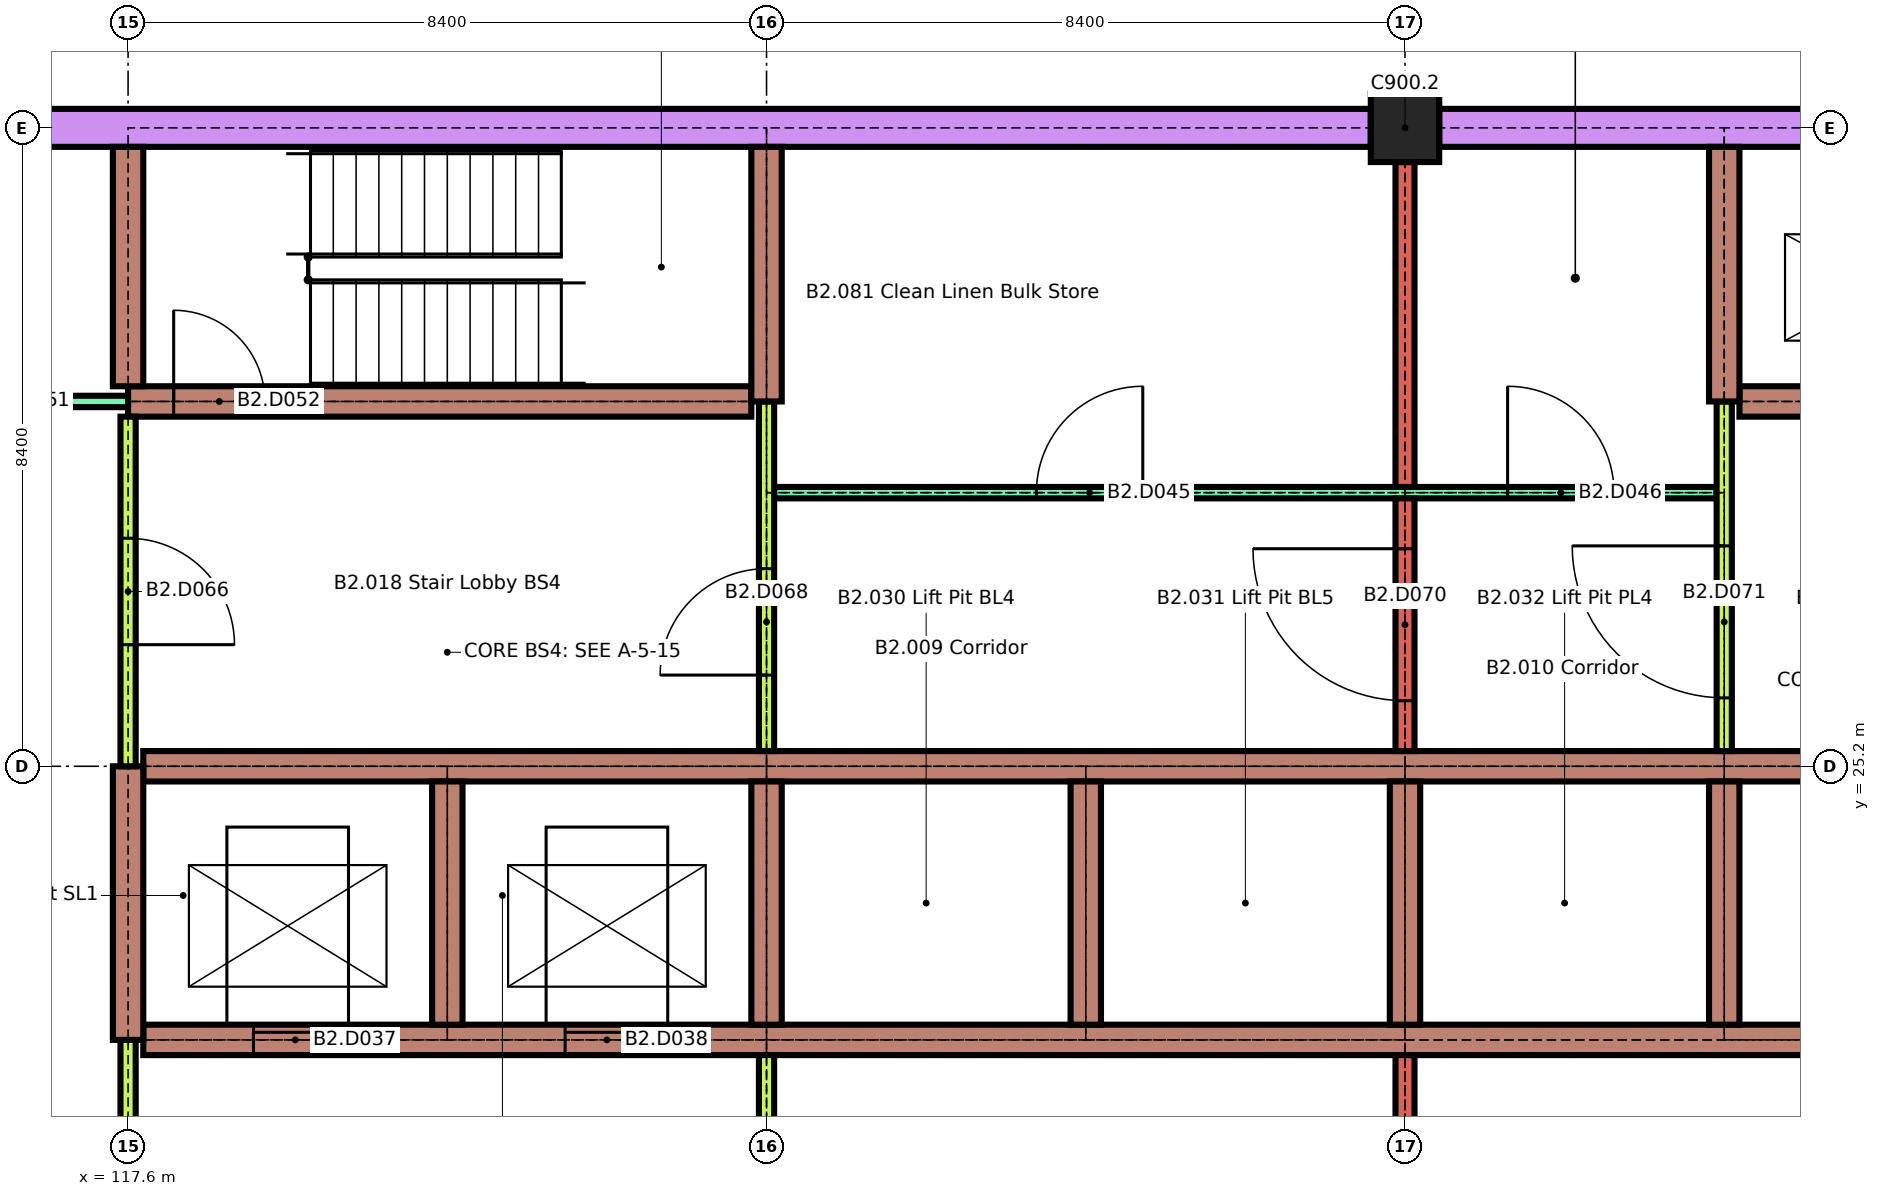
"""IFC4 building model, lengths in metres.
Left out: names, types, materials, properties, quantities, classifications, styles, units other than length and angle.
Written with IfcOpenShell. Run it as: python <this file> out.ifc"""

import sys

from ifc_helpers import new_model, si_unit, direction, frame, frame_2d, origin, origin_2d, place, context, subcontext, project, spatial, rectangle, extrude, element, fill, save


model = new_model("IFC4")
c1 = context("Model", 3, precision=1e-05, world=origin(), true_north=direction((0.0, 1.0)))
c2 = subcontext(c1, "Body", "Model", "MODEL_VIEW")
j1 = project(units=[si_unit("LENGTHUNIT", "METRE"), si_unit("PLANEANGLEUNIT", "RADIAN")], contexts=[c1])
p1 = place(None, origin())
s1 = spatial("IfcSite", under=j1, at=p1, CompositionType="ELEMENT")
p2 = place(p1, origin())
s2 = spatial("IfcBuilding", under=s1, at=p2, CompositionType="ELEMENT")
p3 = place(p2, frame((0.0, 0.0, -7.8)))
s3 = spatial("IfcBuildingStorey", under=s2, at=p3, CompositionType="ELEMENT", Elevation=-7.8)
p4 = place(p3, frame((134.4, 33.6, 0.0), z_axis=(0.0, 0.0, 1.0), x_axis=(1.0, 0.0, 0.0)))
e1 = element("IfcColumn", 1, at=p4, inside=s3, PredefinedType="COLUMN", context=c2, shape_type="SweptSolid", body=[
    extrude(rectangle(XDim=0.9, YDim=0.9, at=origin_2d()), origin(), (0.0, 0.0, 1.0), 3.1),
])
p5 = place(p3, frame((101.25, 33.6, 0.0), z_axis=(0.0, 0.0, 1.0), x_axis=(1.0, 0.0, 0.0)))
e2 = element("IfcWall", 2, at=p5, inside=s3, PredefinedType="SOLIDWALL", context=c2, shape_type="SweptSolid", body=[
    extrude(rectangle(XDim=32.7, YDim=0.5, at=frame_2d((16.35, 0.0))), origin(), (0.0, 0.0, 1.0), 3.1),
])
p6 = place(p3, frame((134.85, 33.6, 0.0), z_axis=(0.0, 0.0, 1.0), x_axis=(1.0, 0.0, 0.0)))
e3 = element("IfcWall", 3, at=p6, inside=s3, PredefinedType="SOLIDWALL", context=c2, shape_type="SweptSolid", body=[
    extrude(rectangle(XDim=15.9, YDim=0.5, at=frame_2d((7.95, 0.0))), origin(), (0.0, 0.0, 1.0), 3.1),
])
p7 = place(p3, frame((117.8, 21.6, 0.0), z_axis=(0.0, 0.0, 1.0), x_axis=(1.0, 0.0, 0.0)))
e4 = element("IfcWall", 4, at=p7, inside=s3, PredefinedType="SHEAR", context=c2, shape_type="SweptSolid", body=[
    extrude(rectangle(XDim=25.0, YDim=0.4, at=frame_2d((12.5, 0.0))), origin(), (0.0, 0.0, 1.0), 3.1),
])
p8 = place(p7, frame((1.45, 0.0, 0.0)))
e5 = element("IfcOpeningElement", 5, at=p8, cuts=e4, PredefinedType="OPENING", context=c2, shape_type="SweptSolid", body=[
    extrude(rectangle(XDim=1.1, YDim=2.1, at=frame_2d((0.55, 1.05))), frame((0.0, 0.21, 0.0), z_axis=(0.0, -1.0, 0.0), x_axis=(1.0, 0.0, 0.0)), (0.0, 0.0, 1.0), 0.42),
])
p9 = place(p7, frame((5.55, 0.0, 0.0)))
e6 = element("IfcOpeningElement", 6, at=p9, cuts=e4, PredefinedType="OPENING", context=c2, shape_type="SweptSolid", body=[
    extrude(rectangle(XDim=1.1, YDim=2.1, at=frame_2d((0.55, 1.05))), frame((0.0, 0.21, 0.0), z_axis=(0.0, -1.0, 0.0), x_axis=(1.0, 0.0, 0.0)), (0.0, 0.0, 1.0), 0.42),
])
p10 = place(p3, frame((117.8, 25.2, 0.0), z_axis=(0.0, 0.0, 1.0), x_axis=(1.0, 0.0, 0.0)))
e7 = element("IfcWall", 7, at=p10, inside=s3, PredefinedType="SHEAR", context=c2, shape_type="SweptSolid", body=[
    extrude(rectangle(XDim=24.8, YDim=0.4, at=frame_2d((12.4, 0.0))), origin(), (0.0, 0.0, 1.0), 3.1),
])
p11 = place(p3, frame((126.1, 28.8, 0.0), z_axis=(0.0, 0.0, 1.0), x_axis=(1.0, 0.0, 0.0)))
e8 = element("IfcWall", 8, at=p11, inside=s3, PredefinedType="PARTITIONING", context=c2, shape_type="SweptSolid", body=[
    extrude(rectangle(XDim=12.4, YDim=0.15, at=frame_2d((6.2, 0.0))), origin(), (0.0, 0.0, 1.0), 3.1),
])
p12 = place(p11, frame((3.45, 0.0, 0.0)))
e9 = element("IfcOpeningElement", 9, at=p12, cuts=e8, PredefinedType="OPENING", context=c2, shape_type="SweptSolid", body=[
    extrude(rectangle(XDim=1.4, YDim=2.1, at=frame_2d((0.7, 1.05))), frame((0.0, 0.085, 0.0), z_axis=(0.0, -1.0, 0.0), x_axis=(1.0, 0.0, 0.0)), (0.0, 0.0, 1.0), 0.17),
])
p13 = place(p11, frame((9.65, 0.0, 0.0)))
e10 = element("IfcOpeningElement", 10, at=p13, cuts=e8, PredefinedType="OPENING", context=c2, shape_type="SweptSolid", body=[
    extrude(rectangle(XDim=1.4, YDim=2.1, at=frame_2d((0.7, 1.05))), frame((0.0, 0.085, 0.0), z_axis=(0.0, -1.0, 0.0), x_axis=(1.0, 0.0, 0.0)), (0.0, 0.0, 1.0), 0.17),
])
p14 = place(p3, frame((113.325, 30.0, 0.0), z_axis=(0.0, 0.0, 1.0), x_axis=(1.0, 0.0, 0.0)))
e11 = element("IfcWall", 11, at=p14, inside=s3, PredefinedType="PARTITIONING", context=c2, shape_type="SweptSolid", body=[
    extrude(rectangle(XDim=4.275, YDim=0.15, at=frame_2d((2.138, 0.0))), origin(), (0.0, 0.0, 1.0), 3.1),
])
p15 = place(p14, frame((1.475, 0.0, 0.0)))
e12 = element("IfcOpeningElement", 12, at=p15, cuts=e11, PredefinedType="OPENING", context=c2, shape_type="SweptSolid", body=[
    extrude(rectangle(XDim=1.4, YDim=2.1, at=frame_2d((0.7, 1.05))), frame((0.0, 0.085, 0.0), z_axis=(0.0, -1.0, 0.0), x_axis=(1.0, 0.0, 0.0)), (0.0, 0.0, 1.0), 0.17),
])
p16 = place(p3, frame((117.6, 30.0, 0.0), z_axis=(0.0, 0.0, 1.0), x_axis=(1.0, 0.0, 0.0)))
e13 = element("IfcWall", 13, at=p16, inside=s3, PredefinedType="SHEAR", context=c2, shape_type="SweptSolid", body=[
    extrude(rectangle(XDim=8.2, YDim=0.4, at=frame_2d((4.1, 0.0))), origin(), (0.0, 0.0, 1.0), 3.1),
])
p17 = place(p16, frame((0.6, 0.0, 0.0)))
e14 = element("IfcOpeningElement", 14, at=p17, cuts=e13, PredefinedType="OPENING", context=c2, shape_type="SweptSolid", body=[
    extrude(rectangle(XDim=1.2, YDim=2.1, at=frame_2d((0.6, 1.05))), frame((0.0, 0.21, 0.0), z_axis=(0.0, -1.0, 0.0), x_axis=(1.0, 0.0, 0.0)), (0.0, 0.0, 1.0), 0.42),
])
p18 = place(p3, frame((138.8, 30.0, 0.0), z_axis=(0.0, 0.0, 1.0), x_axis=(1.0, 0.0, 0.0)))
e15 = element("IfcWall", 15, at=p18, inside=s3, PredefinedType="SHEAR", context=c2, shape_type="SweptSolid", body=[
    extrude(rectangle(XDim=3.8, YDim=0.4, at=frame_2d((1.9, 0.0))), origin(), (0.0, 0.0, 1.0), 3.1),
])
p19 = place(p18, frame((1.35, 0.0, 0.0)))
e16 = element("IfcOpeningElement", 16, at=p19, cuts=e15, PredefinedType="OPENING", context=c2, shape_type="SweptSolid", body=[
    extrude(rectangle(XDim=1.1, YDim=2.1, at=frame_2d((0.55, 1.05))), frame((0.0, 0.21, 0.0), z_axis=(0.0, -1.0, 0.0), x_axis=(1.0, 0.0, 0.0)), (0.0, 0.0, 1.0), 0.42),
])
p20 = place(p3, frame((117.6, 16.9, 0.0), z_axis=(0.0, 0.0, 1.0), x_axis=(0.0, 1.0, 0.0)))
e17 = element("IfcWall", 17, at=p20, inside=s3, PredefinedType="PARTITIONING", context=c2, shape_type="SweptSolid", body=[
    extrude(rectangle(XDim=4.7, YDim=0.2, at=frame_2d((2.35, 0.0))), origin(), (0.0, 0.0, 1.0), 3.1),
])
p21 = place(p20, frame((1.35, 0.0, 0.0)))
e18 = element("IfcOpeningElement", 18, at=p21, cuts=e17, PredefinedType="OPENING", context=c2, shape_type="SweptSolid", body=[
    extrude(rectangle(XDim=2.0, YDim=2.4, at=frame_2d((1.0, 1.2))), frame((0.0, 0.11, 0.0), z_axis=(0.0, -1.0, 0.0), x_axis=(1.0, 0.0, 0.0)), (0.0, 0.0, 1.0), 0.22),
])
p22 = place(p3, frame((117.6, 21.6, 0.0), z_axis=(0.0, 0.0, 1.0), x_axis=(0.0, 1.0, 0.0)))
e19 = element("IfcWall", 19, at=p22, inside=s3, PredefinedType="SHEAR", context=c2, shape_type="SweptSolid", body=[
    extrude(rectangle(XDim=3.6, YDim=0.4, at=frame_2d((1.8, 0.0))), origin(), (0.0, 0.0, 1.0), 3.1),
])
p23 = place(p3, frame((117.6, 25.2, 0.0), z_axis=(0.0, 0.0, 1.0), x_axis=(0.0, 1.0, 0.0)))
e20 = element("IfcWall", 20, at=p23, inside=s3, PredefinedType="PARTITIONING", context=c2, shape_type="SweptSolid", body=[
    extrude(rectangle(XDim=4.6, YDim=0.2, at=frame_2d((2.3, 0.0))), origin(), (0.0, 0.0, 1.0), 3.1),
])
p24 = place(p23, frame((1.6, 0.0, 0.0)))
e21 = element("IfcOpeningElement", 21, at=p24, cuts=e20, PredefinedType="OPENING", context=c2, shape_type="SweptSolid", body=[
    extrude(rectangle(XDim=1.4, YDim=2.1, at=frame_2d((0.7, 1.05))), frame((0.0, 0.11, 0.0), z_axis=(0.0, -1.0, 0.0), x_axis=(1.0, 0.0, 0.0)), (0.0, 0.0, 1.0), 0.22),
])
p25 = place(p3, frame((117.6, 30.2, 0.0), z_axis=(0.0, 0.0, 1.0), x_axis=(0.0, 1.0, 0.0)))
e22 = element("IfcWall", 22, at=p25, inside=s3, PredefinedType="SHEAR", context=c2, shape_type="SweptSolid", body=[
    extrude(rectangle(XDim=3.15, YDim=0.4, at=frame_2d((1.575, 0.0))), origin(), (0.0, 0.0, 1.0), 3.1),
])
p26 = place(p3, frame((121.8, 21.8, 0.0), z_axis=(0.0, 0.0, 1.0), x_axis=(0.0, 1.0, 0.0)))
e23 = element("IfcWall", 23, at=p26, inside=s3, PredefinedType="SHEAR", context=c2, shape_type="SweptSolid", body=[
    extrude(rectangle(XDim=3.2, YDim=0.4, at=frame_2d((1.6, 0.0))), origin(), (0.0, 0.0, 1.0), 3.1),
])
p27 = place(p3, frame((126.0, 16.9, 0.0), z_axis=(0.0, 0.0, 1.0), x_axis=(0.0, 1.0, 0.0)))
e24 = element("IfcWall", 24, at=p27, inside=s3, PredefinedType="PARTITIONING", context=c2, shape_type="SweptSolid", body=[
    extrude(rectangle(XDim=4.5, YDim=0.2, at=frame_2d((2.25, 0.0))), origin(), (0.0, 0.0, 1.0), 3.1),
])
p28 = place(p27, frame((1.25, 0.0, 0.0)))
e25 = element("IfcOpeningElement", 25, at=p28, cuts=e24, PredefinedType="OPENING", context=c2, shape_type="SweptSolid", body=[
    extrude(rectangle(XDim=2.0, YDim=2.4, at=frame_2d((1.0, 1.2))), frame((0.0, 0.11, 0.0), z_axis=(0.0, -1.0, 0.0), x_axis=(1.0, 0.0, 0.0)), (0.0, 0.0, 1.0), 0.22),
])
p29 = place(p3, frame((126.0, 21.8, 0.0), z_axis=(0.0, 0.0, 1.0), x_axis=(0.0, 1.0, 0.0)))
e26 = element("IfcWall", 26, at=p29, inside=s3, PredefinedType="SHEAR", context=c2, shape_type="SweptSolid", body=[
    extrude(rectangle(XDim=3.2, YDim=0.4, at=frame_2d((1.6, 0.0))), origin(), (0.0, 0.0, 1.0), 3.1),
])
p30 = place(p3, frame((126.0, 25.4, 0.0), z_axis=(0.0, 0.0, 1.0), x_axis=(0.0, 1.0, 0.0)))
e27 = element("IfcWall", 27, at=p30, inside=s3, PredefinedType="PARTITIONING", context=c2, shape_type="SweptSolid", body=[
    extrude(rectangle(XDim=4.6, YDim=0.2, at=frame_2d((2.3, 0.0))), origin(), (0.0, 0.0, 1.0), 3.1),
])
p31 = place(p30, frame((1.0, 0.0, 0.0)))
e28 = element("IfcOpeningElement", 28, at=p31, cuts=e27, PredefinedType="OPENING", context=c2, shape_type="SweptSolid", body=[
    extrude(rectangle(XDim=1.4, YDim=2.1, at=frame_2d((0.7, 1.05))), frame((0.0, 0.11, 0.0), z_axis=(0.0, -1.0, 0.0), x_axis=(1.0, 0.0, 0.0)), (0.0, 0.0, 1.0), 0.22),
])
p32 = place(p3, frame((126.0, 30.0, 0.0), z_axis=(0.0, 0.0, 1.0), x_axis=(0.0, 1.0, 0.0)))
e29 = element("IfcWall", 29, at=p32, inside=s3, PredefinedType="SHEAR", context=c2, shape_type="SweptSolid", body=[
    extrude(rectangle(XDim=3.35, YDim=0.4, at=frame_2d((1.675, 0.0))), origin(), (0.0, 0.0, 1.0), 3.1),
])
p33 = place(p3, frame((130.2, 21.8, 0.0), z_axis=(0.0, 0.0, 1.0), x_axis=(0.0, 1.0, 0.0)))
e30 = element("IfcWall", 30, at=p33, inside=s3, PredefinedType="SHEAR", context=c2, shape_type="SweptSolid", body=[
    extrude(rectangle(XDim=3.2, YDim=0.4, at=frame_2d((1.6, 0.0))), origin(), (0.0, 0.0, 1.0), 3.1),
])
p34 = place(p3, frame((134.4, 16.875, 0.0), z_axis=(0.0, 0.0, 1.0), x_axis=(0.0, 1.0, 0.0)))
e31 = element("IfcWall", 31, at=p34, inside=s3, PredefinedType="SOLIDWALL", context=c2, shape_type="SweptSolid", body=[
    extrude(rectangle(XDim=4.525, YDim=0.25, at=frame_2d((2.262, 0.0))), origin(), (0.0, 0.0, 1.0), 3.1),
])
p35 = place(p34, frame((1.262, 0.0, 0.0)))
e32 = element("IfcOpeningElement", 32, at=p35, cuts=e31, PredefinedType="OPENING", context=c2, shape_type="SweptSolid", body=[
    extrude(rectangle(XDim=2.0, YDim=2.4, at=frame_2d((1.0, 1.2))), frame((0.0, 0.135, 0.0), z_axis=(0.0, -1.0, 0.0), x_axis=(1.0, 0.0, 0.0)), (0.0, 0.0, 1.0), 0.27),
])
p36 = place(p3, frame((134.4, 21.8, 0.0), z_axis=(0.0, 0.0, 1.0), x_axis=(0.0, 1.0, 0.0)))
e33 = element("IfcWall", 33, at=p36, inside=s3, PredefinedType="SHEAR", context=c2, shape_type="SweptSolid", body=[
    extrude(rectangle(XDim=3.2, YDim=0.4, at=frame_2d((1.6, 0.0))), origin(), (0.0, 0.0, 1.0), 3.1),
])
p37 = place(p3, frame((134.4, 25.4, 0.0), z_axis=(0.0, 0.0, 1.0), x_axis=(0.0, 1.0, 0.0)))
e34 = element("IfcWall", 34, at=p37, inside=s3, PredefinedType="SOLIDWALL", context=c2, shape_type="SweptSolid", body=[
    extrude(rectangle(XDim=3.325, YDim=0.25, at=frame_2d((1.663, 0.0))), origin(), (0.0, 0.0, 1.0), 3.1),
])
p38 = place(p37, frame((0.663, 0.0, 0.0)))
e35 = element("IfcOpeningElement", 35, at=p38, cuts=e34, PredefinedType="OPENING", context=c2, shape_type="SweptSolid", body=[
    extrude(rectangle(XDim=2.0, YDim=2.4, at=frame_2d((1.0, 1.2))), frame((0.0, 0.135, 0.0), z_axis=(0.0, -1.0, 0.0), x_axis=(1.0, 0.0, 0.0)), (0.0, 0.0, 1.0), 0.27),
])
p39 = place(p3, frame((134.4, 28.875, 0.0), z_axis=(0.0, 0.0, 1.0), x_axis=(0.0, 1.0, 0.0)))
e36 = element("IfcWall", 36, at=p39, inside=s3, PredefinedType="SOLIDWALL", context=c2, shape_type="SweptSolid", body=[
    extrude(rectangle(XDim=4.275, YDim=0.25, at=frame_2d((2.137, 0.0))), origin(), (0.0, 0.0, 1.0), 3.1),
])
p40 = place(p3, frame((138.6, 21.8, 0.0), z_axis=(0.0, 0.0, 1.0), x_axis=(0.0, 1.0, 0.0)))
e37 = element("IfcWall", 37, at=p40, inside=s3, PredefinedType="SHEAR", context=c2, shape_type="SweptSolid", body=[
    extrude(rectangle(XDim=3.2, YDim=0.4, at=frame_2d((1.6, 0.0))), origin(), (0.0, 0.0, 1.0), 3.1),
])
p41 = place(p3, frame((138.6, 25.4, 0.0), z_axis=(0.0, 0.0, 1.0), x_axis=(0.0, 1.0, 0.0)))
e38 = element("IfcWall", 38, at=p41, inside=s3, PredefinedType="PARTITIONING", context=c2, shape_type="SweptSolid", body=[
    extrude(rectangle(XDim=4.6, YDim=0.2, at=frame_2d((2.3, 0.0))), origin(), (0.0, 0.0, 1.0), 3.1),
])
p42 = place(p41, frame((0.7, 0.0, 0.0)))
e39 = element("IfcOpeningElement", 39, at=p42, cuts=e38, PredefinedType="OPENING", context=c2, shape_type="SweptSolid", body=[
    extrude(rectangle(XDim=2.0, YDim=2.4, at=frame_2d((1.0, 1.2))), frame((0.0, 0.11, 0.0), z_axis=(0.0, -1.0, 0.0), x_axis=(1.0, 0.0, 0.0)), (0.0, 0.0, 1.0), 0.22),
])
p43 = place(p3, frame((138.6, 30.0, 0.0), z_axis=(0.0, 0.0, 1.0), x_axis=(0.0, 1.0, 0.0)))
e40 = element("IfcWall", 40, at=p43, inside=s3, PredefinedType="SHEAR", context=c2, shape_type="SweptSolid", body=[
    extrude(rectangle(XDim=3.35, YDim=0.4, at=frame_2d((1.675, 0.0))), origin(), (0.0, 0.0, 1.0), 3.1),
])
p44 = place(p8, origin())
e41 = element("IfcDoor", 41, at=p44, inside=s3, OperationType="SLIDING_TO_LEFT", PredefinedType="DOOR", context=c2, shape_type="SweptSolid", body=[
    extrude(rectangle(XDim=1.1, YDim=2.1, at=frame_2d((0.55, 1.05))), frame((0.0, 0.025, 0.0), z_axis=(0.0, -1.0, 0.0), x_axis=(1.0, 0.0, 0.0)), (0.0, 0.0, 1.0), 0.05),
])
fill(e5, e41)
p45 = place(p9, origin())
e42 = element("IfcDoor", 42, at=p45, inside=s3, OperationType="SLIDING_TO_LEFT", PredefinedType="DOOR", context=c2, shape_type="SweptSolid", body=[
    extrude(rectangle(XDim=1.1, YDim=2.1, at=frame_2d((0.55, 1.05))), frame((0.0, 0.025, 0.0), z_axis=(0.0, -1.0, 0.0), x_axis=(1.0, 0.0, 0.0)), (0.0, 0.0, 1.0), 0.05),
])
fill(e6, e42)
p46 = place(p12, origin())
e43 = element("IfcDoor", 43, at=p46, inside=s3, OperationType="SINGLE_SWING_LEFT", PredefinedType="DOOR", context=c2, shape_type="SweptSolid", body=[
    extrude(rectangle(XDim=1.4, YDim=2.1, at=frame_2d((0.7, 1.05))), frame((0.0, 0.025, 0.0), z_axis=(0.0, -1.0, 0.0), x_axis=(1.0, 0.0, 0.0)), (0.0, 0.0, 1.0), 0.05),
])
fill(e9, e43)
p47 = place(p13, origin())
e44 = element("IfcDoor", 44, at=p47, inside=s3, OperationType="SINGLE_SWING_RIGHT", PredefinedType="DOOR", context=c2, shape_type="SweptSolid", body=[
    extrude(rectangle(XDim=1.4, YDim=2.1, at=frame_2d((0.7, 1.05))), frame((0.0, 0.025, 0.0), z_axis=(0.0, -1.0, 0.0), x_axis=(1.0, 0.0, 0.0)), (0.0, 0.0, 1.0), 0.05),
])
fill(e10, e44)
p48 = place(p17, origin())
e45 = element("IfcDoor", 45, at=p48, inside=s3, OperationType="SINGLE_SWING_RIGHT", PredefinedType="DOOR", context=c2, shape_type="SweptSolid", body=[
    extrude(rectangle(XDim=1.2, YDim=2.1, at=frame_2d((0.6, 1.05))), frame((0.0, 0.025, 0.0), z_axis=(0.0, -1.0, 0.0), x_axis=(1.0, 0.0, 0.0)), (0.0, 0.0, 1.0), 0.05),
])
fill(e14, e45)
p49 = place(p24, origin())
e46 = element("IfcDoor", 46, at=p49, inside=s3, OperationType="SINGLE_SWING_LEFT", PredefinedType="DOOR", context=c2, shape_type="SweptSolid", body=[
    extrude(rectangle(XDim=1.4, YDim=2.1, at=frame_2d((0.7, 1.05))), frame((0.0, 0.03, 0.0), z_axis=(0.0, -1.0, 0.0), x_axis=(1.0, 0.0, 0.0)), (0.0, 0.0, 1.0), 0.06),
])
fill(e21, e46)
p50 = place(p31, origin())
e47 = element("IfcDoor", 47, at=p50, inside=s3, OperationType="SINGLE_SWING_RIGHT", PredefinedType="DOOR", context=c2, shape_type="SweptSolid", body=[
    extrude(rectangle(XDim=1.4, YDim=2.1, at=frame_2d((0.7, 1.05))), frame((0.0, 0.03, 0.0), z_axis=(0.0, -1.0, 0.0), x_axis=(1.0, 0.0, 0.0)), (0.0, 0.0, 1.0), 0.06),
])
fill(e28, e47)
p51 = place(p38, origin())
e48 = element("IfcDoor", 48, at=p51, inside=s3, OperationType="SINGLE_SWING_LEFT", PredefinedType="DOOR", context=c2, shape_type="SweptSolid", body=[
    extrude(rectangle(XDim=2.0, YDim=2.4, at=frame_2d((1.0, 1.2))), frame((0.0, 0.03, 0.0), z_axis=(0.0, -1.0, 0.0), x_axis=(1.0, 0.0, 0.0)), (0.0, 0.0, 1.0), 0.06),
])
fill(e35, e48)
p52 = place(p42, origin())
e49 = element("IfcDoor", 49, at=p52, inside=s3, OperationType="SINGLE_SWING_LEFT", PredefinedType="DOOR", context=c2, shape_type="SweptSolid", body=[
    extrude(rectangle(XDim=2.0, YDim=2.4, at=frame_2d((1.0, 1.2))), frame((0.0, 0.03, 0.0), z_axis=(0.0, -1.0, 0.0), x_axis=(1.0, 0.0, 0.0)), (0.0, 0.0, 1.0), 0.06),
])
fill(e39, e49)
save(model, sys.argv[1])
